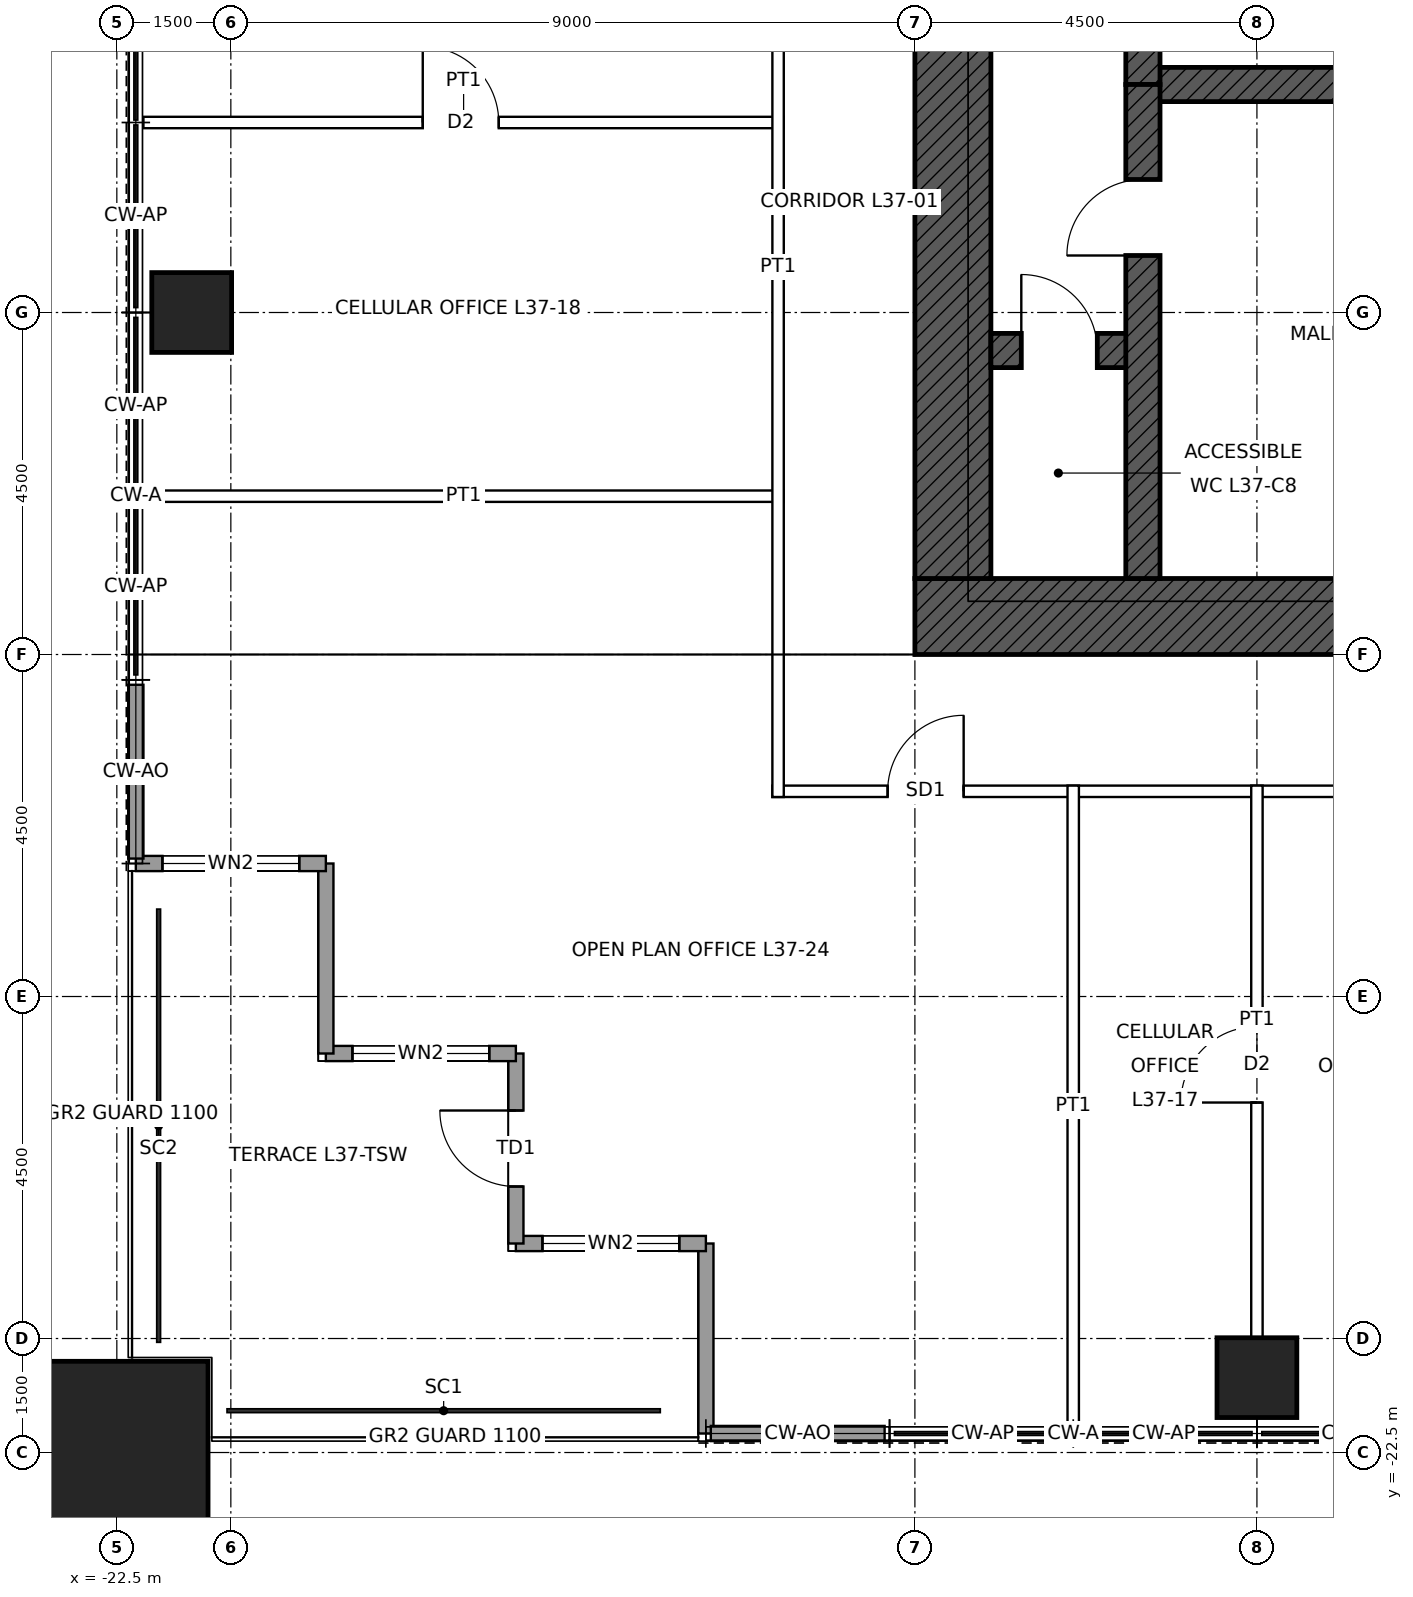
"""IFC4 building model, lengths in metres.
Left out: names, types, materials, properties, quantities, classifications, styles, units other than length and angle.
Written with IfcOpenShell. Run it as: python <this file> out.ifc"""

import sys

from ifc_helpers import new_model, si_unit, direction, frame, frame_2d, origin, origin_2d, place, context, subcontext, project, spatial, rectangle, hollow_rectangle, extrude, element, fill, save


model = new_model("IFC4")
c1 = context("Model", 3, precision=1e-05, world=origin(), true_north=direction((0.0, 1.0)))
c2 = subcontext(c1, "Body", "Model", "MODEL_VIEW")
j1 = project(units=[si_unit("LENGTHUNIT", "METRE"), si_unit("PLANEANGLEUNIT", "RADIAN")], contexts=[c1])
p1 = place(None, origin())
s1 = spatial("IfcSite", under=j1, at=p1, CompositionType="ELEMENT")
p2 = place(p1, origin())
s2 = spatial("IfcBuilding", under=s1, at=p2, CompositionType="ELEMENT")
p3 = place(p2, frame((0.0, 0.0, 181.9)))
s3 = spatial("IfcBuildingStorey", under=s2, at=p3, CompositionType="ELEMENT", Elevation=181.9)
p4 = place(p3, frame((-22.5, -22.5, 0.0), z_axis=(0.0, 0.0, 1.0), x_axis=(1.0, 0.0, 0.0)))
e1 = element("IfcColumn", 1, at=p4, inside=s3, PredefinedType="COLUMN", context=c2, shape_type="SweptSolid", body=[
    extrude(hollow_rectangle(XDim=2.4, YDim=2.4, WallThickness=0.12, at=origin_2d()), origin(), (0.0, 0.0, 1.0), 4.0),
])
for number, where, z_axis, x_axis in (
    (2, (-7.5, -21.515, 0.0), (0.0, 0.0, 1.0), (1.0, 0.0, 0.0)),
    (3, (-21.515, -7.5, 0.0), (0.0, 0.0, 1.0), (1.0, 0.0, 0.0)),
):
    element("IfcColumn", number, at=place(p3, frame(where, z_axis=z_axis, x_axis=x_axis)), inside=s3, PredefinedType="COLUMN", context=c2, shape_type="SweptSolid", body=[
        extrude(hollow_rectangle(XDim=1.05, YDim=1.05, WallThickness=0.075, at=origin_2d()), origin(), (0.0, 0.0, 1.0), 4.0),
    ])
p5 = place(p3, frame((12.0, -11.5, 0.0), z_axis=(0.0, 0.0, 1.0), x_axis=(-1.0, 0.0, 0.0)))
e4 = element("IfcWall", 4, at=p5, inside=s3, PredefinedType="SHEAR", context=c2, shape_type="SweptSolid", body=[
    extrude(rectangle(XDim=24.0, YDim=1.0, at=frame_2d((12.0, 0.0))), origin(), (0.0, 0.0, 1.0), 4.0),
])
p6 = place(p5, frame((11.5, 0.0, 0.0)))
e5 = element("IfcOpeningElement", 5, at=p6, cuts=e4, PredefinedType="OPENING", context=c2, shape_type="SweptSolid", body=[
    extrude(rectangle(XDim=1.0, YDim=2.1, at=frame_2d((0.5, 1.05))), frame((0.0, 0.51, 0.0), z_axis=(0.0, -1.0, 0.0), x_axis=(1.0, 0.0, 0.0)), (0.0, 0.0, 1.0), 1.02),
])
p7 = place(p5, frame((1.0, 0.0, 0.0)))
e6 = element("IfcOpeningElement", 6, at=p7, cuts=e4, PredefinedType="OPENING", context=c2, shape_type="SweptSolid", body=[
    extrude(rectangle(XDim=1.0, YDim=2.4, at=frame_2d((0.5, 1.2))), frame((0.0, 0.51, 0.0), z_axis=(0.0, -1.0, 0.0), x_axis=(1.0, 0.0, 0.0)), (0.0, 0.0, 1.0), 1.02),
])
p8 = place(p3, frame((-11.5, -11.0, 0.0), z_axis=(0.0, 0.0, 1.0), x_axis=(0.0, 1.0, 0.0)))
e7 = element("IfcWall", 7, at=p8, inside=s3, PredefinedType="SHEAR", context=c2, shape_type="SweptSolid", body=[
    extrude(rectangle(XDim=22.0, YDim=1.0, at=frame_2d((11.0, 0.0))), origin(), (0.0, 0.0, 1.0), 4.0),
])
p9 = place(p8, frame((10.5, 0.0, 0.0)))
e8 = element("IfcOpeningElement", 8, at=p9, cuts=e7, PredefinedType="OPENING", context=c2, shape_type="SweptSolid", body=[
    extrude(rectangle(XDim=1.0, YDim=2.4, at=frame_2d((0.5, 1.2))), frame((0.0, 0.51, 0.0), z_axis=(0.0, -1.0, 0.0), x_axis=(1.0, 0.0, 0.0)), (0.0, 0.0, 1.0), 1.02),
])
p10 = place(p3, frame((-9.0, -4.5, 0.0), z_axis=(0.0, 0.0, 1.0), x_axis=(1.0, 0.0, 0.0)))
e9 = element("IfcWall", 9, at=p10, inside=s3, PredefinedType="SHEAR", context=c2, shape_type="SweptSolid", body=[
    extrude(rectangle(XDim=18.0, YDim=0.45, at=frame_2d((9.0, 0.0))), origin(), (0.0, 0.0, 1.0), 4.0),
])
p11 = place(p3, frame((-11.0, -8.0, 0.0), z_axis=(0.0, 0.0, 1.0), x_axis=(1.0, 0.0, 0.0)))
e10 = element("IfcWall", 10, at=p11, inside=s3, PredefinedType="SHEAR", context=c2, shape_type="SweptSolid", body=[
    extrude(rectangle(XDim=2.0, YDim=0.45, at=frame_2d((1.0, 0.0))), origin(), (0.0, 0.0, 1.0), 4.0),
])
p12 = place(p11, frame((0.4, 0.0, 0.0)))
e11 = element("IfcOpeningElement", 11, at=p12, cuts=e10, PredefinedType="OPENING", context=c2, shape_type="SweptSolid", body=[
    extrude(rectangle(XDim=1.0, YDim=2.1, at=frame_2d((0.5, 1.05))), frame((0.0, 0.235, 0.0), z_axis=(0.0, -1.0, 0.0), x_axis=(1.0, 0.0, 0.0)), (0.0, 0.0, 1.0), 0.47),
])
p13 = place(p3, frame((-9.0, -4.5, 0.0), z_axis=(0.0, 0.0, 1.0), x_axis=(0.0, 1.0, 0.0)))
e12 = element("IfcWall", 12, at=p13, inside=s3, PredefinedType="SHEAR", context=c2, shape_type="SweptSolid", body=[
    extrude(rectangle(XDim=3.0, YDim=0.45, at=frame_2d((1.5, 0.0))), origin(), (0.0, 0.0, 1.0), 4.0),
])
p14 = place(p3, frame((-9.0, -11.0, 0.0), z_axis=(0.0, 0.0, 1.0), x_axis=(0.0, 1.0, 0.0)))
e13 = element("IfcWall", 13, at=p14, inside=s3, PredefinedType="SHEAR", context=c2, shape_type="SweptSolid", body=[
    extrude(rectangle(XDim=6.5, YDim=0.45, at=frame_2d((3.25, 0.0))), origin(), (0.0, 0.0, 1.0), 4.0),
])
p15 = place(p14, frame((4.25, 0.0, 0.0)))
e14 = element("IfcOpeningElement", 14, at=p15, cuts=e13, PredefinedType="OPENING", context=c2, shape_type="SweptSolid", body=[
    extrude(rectangle(XDim=1.0, YDim=2.1, at=frame_2d((0.5, 1.05))), frame((0.0, 0.235, 0.0), z_axis=(0.0, -1.0, 0.0), x_axis=(1.0, 0.0, 0.0)), (0.0, 0.0, 1.0), 0.47),
])
p16 = place(p3, frame((-14.75, -22.25, 0.0), z_axis=(0.0, 0.0, 1.0), x_axis=(0.0, 1.0, 0.0)))
e15 = element("IfcWall", 15, at=p16, inside=s3, PredefinedType="SOLIDWALL", context=c2, shape_type="SweptSolid", body=[
    extrude(rectangle(XDim=2.5, YDim=0.2, at=frame_2d((1.25, 0.0))), origin(), (0.0, 0.0, 1.0), 3.85),
])
p17 = place(p3, frame((-14.75, -19.75, 0.0), z_axis=(0.0, 0.0, 1.0), x_axis=(-1.0, 0.0, 0.0)))
e16 = element("IfcWall", 16, at=p17, inside=s3, PredefinedType="SOLIDWALL", context=c2, shape_type="SweptSolid", body=[
    extrude(rectangle(XDim=2.5, YDim=0.2, at=frame_2d((1.25, 0.0))), origin(), (0.0, 0.0, 1.0), 3.85),
])
p18 = place(p17, frame((0.35, 0.0, 0.3)))
e17 = element("IfcOpeningElement", 17, at=p18, cuts=e16, PredefinedType="OPENING", context=c2, shape_type="SweptSolid", body=[
    extrude(rectangle(XDim=1.8, YDim=2.4, at=frame_2d((0.9, 1.2))), frame((0.0, 0.11, 0.0), z_axis=(0.0, -1.0, 0.0), x_axis=(1.0, 0.0, 0.0)), (0.0, 0.0, 1.0), 0.22),
])
p19 = place(p3, frame((-17.25, -19.75, 0.0), z_axis=(0.0, 0.0, 1.0), x_axis=(0.0, 1.0, 0.0)))
e18 = element("IfcWall", 18, at=p19, inside=s3, PredefinedType="SOLIDWALL", context=c2, shape_type="SweptSolid", body=[
    extrude(rectangle(XDim=2.5, YDim=0.2, at=frame_2d((1.25, 0.0))), origin(), (0.0, 0.0, 1.0), 3.85),
])
p20 = place(p19, frame((0.75, 0.0, 0.0)))
e19 = element("IfcOpeningElement", 19, at=p20, cuts=e18, PredefinedType="OPENING", context=c2, shape_type="SweptSolid", body=[
    extrude(rectangle(XDim=1.0, YDim=2.4, at=frame_2d((0.5, 1.2))), frame((0.0, 0.11, 0.0), z_axis=(0.0, -1.0, 0.0), x_axis=(1.0, 0.0, 0.0)), (0.0, 0.0, 1.0), 0.22),
])
p21 = place(p3, frame((-17.25, -17.25, 0.0), z_axis=(0.0, 0.0, 1.0), x_axis=(-1.0, 0.0, 0.0)))
e20 = element("IfcWall", 20, at=p21, inside=s3, PredefinedType="SOLIDWALL", context=c2, shape_type="SweptSolid", body=[
    extrude(rectangle(XDim=2.5, YDim=0.2, at=frame_2d((1.25, 0.0))), origin(), (0.0, 0.0, 1.0), 3.85),
])
p22 = place(p21, frame((0.35, 0.0, 0.3)))
e21 = element("IfcOpeningElement", 21, at=p22, cuts=e20, PredefinedType="OPENING", context=c2, shape_type="SweptSolid", body=[
    extrude(rectangle(XDim=1.8, YDim=2.4, at=frame_2d((0.9, 1.2))), frame((0.0, 0.11, 0.0), z_axis=(0.0, -1.0, 0.0), x_axis=(1.0, 0.0, 0.0)), (0.0, 0.0, 1.0), 0.22),
])
p23 = place(p3, frame((-19.75, -17.25, 0.0), z_axis=(0.0, 0.0, 1.0), x_axis=(0.0, 1.0, 0.0)))
e22 = element("IfcWall", 22, at=p23, inside=s3, PredefinedType="SOLIDWALL", context=c2, shape_type="SweptSolid", body=[
    extrude(rectangle(XDim=2.5, YDim=0.2, at=frame_2d((1.25, 0.0))), origin(), (0.0, 0.0, 1.0), 3.85),
])
p24 = place(p3, frame((-19.75, -14.75, 0.0), z_axis=(0.0, 0.0, 1.0), x_axis=(-1.0, 0.0, 0.0)))
e23 = element("IfcWall", 23, at=p24, inside=s3, PredefinedType="SOLIDWALL", context=c2, shape_type="SweptSolid", body=[
    extrude(rectangle(XDim=2.5, YDim=0.2, at=frame_2d((1.25, 0.0))), origin(), (0.0, 0.0, 1.0), 3.85),
])
p25 = place(p24, frame((0.35, 0.0, 0.3)))
e24 = element("IfcOpeningElement", 24, at=p25, cuts=e23, PredefinedType="OPENING", context=c2, shape_type="SweptSolid", body=[
    extrude(rectangle(XDim=1.8, YDim=2.4, at=frame_2d((0.9, 1.2))), frame((0.0, 0.11, 0.0), z_axis=(0.0, -1.0, 0.0), x_axis=(1.0, 0.0, 0.0)), (0.0, 0.0, 1.0), 0.22),
])
for number, where, z_axis, x_axis in (
    (25, (-12.398, -22.25, 0.0), (0.0, 0.0, 1.0), (-1.0, 0.0, 0.0)),
    (26, (-22.25, -14.685, 0.0), (0.0, 0.0, 1.0), (0.0, 1.0, 0.0)),
):
    element("IfcWall", number, at=place(p3, frame(where, z_axis=z_axis, x_axis=x_axis)), inside=s3, PredefinedType="SOLIDWALL", context=c2, shape_type="SweptSolid", body=[
        extrude(rectangle(XDim=2.287, YDim=0.2, at=frame_2d((1.144, 0.0))), origin(), (0.0, 0.0, 1.0), 3.85),
    ])
p26 = place(p3, frame((-13.875, -13.8, 0.0), z_axis=(0.0, 0.0, 1.0), x_axis=(1.0, 0.0, 0.0)))
e27 = element("IfcWall", 27, at=p26, inside=s3, PredefinedType="PARTITIONING", context=c2, shape_type="SweptSolid", body=[
    extrude(rectangle(XDim=27.75, YDim=0.15, at=frame_2d((13.875, 0.0))), origin(), (0.0, 0.0, 1.0), 3.85),
])
p27 = place(p26, frame((18.375, 0.0, 0.0)))
e28 = element("IfcOpeningElement", 28, at=p27, cuts=e27, PredefinedType="OPENING", context=c2, shape_type="SweptSolid", body=[
    extrude(rectangle(XDim=1.0, YDim=2.4, at=frame_2d((0.5, 1.2))), frame((0.0, 0.085, 0.0), z_axis=(0.0, -1.0, 0.0), x_axis=(1.0, 0.0, 0.0)), (0.0, 0.0, 1.0), 0.17),
])
p28 = place(p26, frame((14.975, 0.0, 0.0)))
e29 = element("IfcOpeningElement", 29, at=p28, cuts=e27, PredefinedType="OPENING", context=c2, shape_type="SweptSolid", body=[
    extrude(rectangle(XDim=1.0, YDim=2.1, at=frame_2d((0.5, 1.05))), frame((0.0, 0.085, 0.0), z_axis=(0.0, -1.0, 0.0), x_axis=(1.0, 0.0, 0.0)), (0.0, 0.0, 1.0), 0.17),
])
p29 = place(p26, frame((11.775, 0.0, 0.0)))
e30 = element("IfcOpeningElement", 30, at=p29, cuts=e27, PredefinedType="OPENING", context=c2, shape_type="SweptSolid", body=[
    extrude(rectangle(XDim=1.0, YDim=2.1, at=frame_2d((0.5, 1.05))), frame((0.0, 0.085, 0.0), z_axis=(0.0, -1.0, 0.0), x_axis=(1.0, 0.0, 0.0)), (0.0, 0.0, 1.0), 0.17),
])
p30 = place(p26, frame((8.375, 0.0, 0.0)))
e31 = element("IfcOpeningElement", 31, at=p30, cuts=e27, PredefinedType="OPENING", context=c2, shape_type="SweptSolid", body=[
    extrude(rectangle(XDim=1.0, YDim=2.4, at=frame_2d((0.5, 1.2))), frame((0.0, 0.085, 0.0), z_axis=(0.0, -1.0, 0.0), x_axis=(1.0, 0.0, 0.0)), (0.0, 0.0, 1.0), 0.17),
])
p31 = place(p26, frame((25.65, 0.0, 0.0)))
e32 = element("IfcOpeningElement", 32, at=p31, cuts=e27, PredefinedType="OPENING", context=c2, shape_type="SweptSolid", body=[
    extrude(rectangle(XDim=1.0, YDim=2.4, at=frame_2d((0.5, 1.2))), frame((0.0, 0.085, 0.0), z_axis=(0.0, -1.0, 0.0), x_axis=(1.0, 0.0, 0.0)), (0.0, 0.0, 1.0), 0.17),
])
p32 = place(p26, frame((1.517, 0.0, 0.0)))
e33 = element("IfcOpeningElement", 33, at=p32, cuts=e27, PredefinedType="OPENING", context=c2, shape_type="SweptSolid", body=[
    extrude(rectangle(XDim=1.0, YDim=2.4, at=frame_2d((0.5, 1.2))), frame((0.0, 0.085, 0.0), z_axis=(0.0, -1.0, 0.0), x_axis=(1.0, 0.0, 0.0)), (0.0, 0.0, 1.0), 0.17),
])
p33 = place(p3, frame((-22.15, -9.917, 0.0), z_axis=(0.0, 0.0, 1.0), x_axis=(1.0, 0.0, 0.0)))
e34 = element("IfcWall", 34, at=p33, inside=s3, PredefinedType="PARTITIONING", context=c2, shape_type="SweptSolid", body=[
    extrude(rectangle(XDim=8.425, YDim=0.15, at=frame_2d((4.212, 0.0))), origin(), (0.0, 0.0, 1.0), 3.85),
])
p34 = place(p3, frame((-22.15, -5.0, 0.0), z_axis=(0.0, 0.0, 1.0), x_axis=(1.0, 0.0, 0.0)))
e35 = element("IfcWall", 35, at=p34, inside=s3, PredefinedType="PARTITIONING", context=c2, shape_type="SweptSolid", body=[
    extrude(rectangle(XDim=8.425, YDim=0.15, at=frame_2d((4.212, 0.0))), origin(), (0.0, 0.0, 1.0), 3.85),
])
p35 = place(p34, frame((3.675, 0.0, 0.0)))
e36 = element("IfcOpeningElement", 36, at=p35, cuts=e35, PredefinedType="OPENING", context=c2, shape_type="SweptSolid", body=[
    extrude(rectangle(XDim=1.0, YDim=2.1, at=frame_2d((0.5, 1.05))), frame((0.0, 0.085, 0.0), z_axis=(0.0, -1.0, 0.0), x_axis=(1.0, 0.0, 0.0)), (0.0, 0.0, 1.0), 0.17),
])
p36 = place(p3, frame((-13.8, -13.875, 0.0), z_axis=(0.0, 0.0, 1.0), x_axis=(0.0, 1.0, 0.0)))
e37 = element("IfcWall", 37, at=p36, inside=s3, PredefinedType="PARTITIONING", context=c2, shape_type="SweptSolid", body=[
    extrude(rectangle(XDim=13.95, YDim=0.15, at=frame_2d((6.975, 0.0))), origin(), (0.0, 0.0, 1.0), 3.85),
])
p37 = place(p36, frame((10.875, 0.0, 0.0)))
e38 = element("IfcOpeningElement", 38, at=p37, cuts=e37, PredefinedType="OPENING", context=c2, shape_type="SweptSolid", body=[
    extrude(rectangle(XDim=1.0, YDim=2.4, at=frame_2d((0.5, 1.2))), frame((0.0, 0.085, 0.0), z_axis=(0.0, -1.0, 0.0), x_axis=(1.0, 0.0, 0.0)), (0.0, 0.0, 1.0), 0.17),
])
p38 = place(p3, frame((-9.917, -22.15, 0.0), z_axis=(0.0, 0.0, 1.0), x_axis=(0.0, 1.0, 0.0)))
e39 = element("IfcWall", 39, at=p38, inside=s3, PredefinedType="PARTITIONING", context=c2, shape_type="SweptSolid", body=[
    extrude(rectangle(XDim=8.425, YDim=0.15, at=frame_2d((4.212, 0.0))), origin(), (0.0, 0.0, 1.0), 3.85),
])
p39 = place(p3, frame((-7.5, -20.99, 0.0), z_axis=(0.0, 0.0, 1.0), x_axis=(0.0, 1.0, 0.0)))
e40 = element("IfcWall", 40, at=p39, inside=s3, PredefinedType="PARTITIONING", context=c2, shape_type="SweptSolid", body=[
    extrude(rectangle(XDim=7.265, YDim=0.15, at=frame_2d((3.632, 0.0))), origin(), (0.0, 0.0, 1.0), 3.238),
])
p40 = place(p39, frame((3.095, 0.0, 0.0)))
e41 = element("IfcOpeningElement", 41, at=p40, cuts=e40, PredefinedType="OPENING", context=c2, shape_type="SweptSolid", body=[
    extrude(rectangle(XDim=1.0, YDim=2.1, at=frame_2d((0.5, 1.05))), frame((0.0, 0.085, 0.0), z_axis=(0.0, -1.0, 0.0), x_axis=(1.0, 0.0, 0.0)), (0.0, 0.0, 1.0), 0.17),
])
p41 = place(p18, origin())
e42 = element("IfcWindow", 42, at=p41, inside=s3, PartitioningType="SINGLE_PANEL", PredefinedType="WINDOW", context=c2, shape_type="SweptSolid", body=[
    extrude(rectangle(XDim=1.8, YDim=2.4, at=frame_2d((0.9, 1.2))), frame((0.0, 0.03, 0.0), z_axis=(0.0, -1.0, 0.0), x_axis=(1.0, 0.0, 0.0)), (0.0, 0.0, 1.0), 0.06),
])
fill(e17, e42)
p42 = place(p20, origin())
e43 = element("IfcDoor", 43, at=p42, inside=s3, OperationType="SINGLE_SWING_RIGHT", PredefinedType="DOOR", context=c2, shape_type="SweptSolid", body=[
    extrude(rectangle(XDim=1.0, YDim=2.4, at=frame_2d((0.5, 1.2))), frame((0.0, 0.025, 0.0), z_axis=(0.0, -1.0, 0.0), x_axis=(1.0, 0.0, 0.0)), (0.0, 0.0, 1.0), 0.05),
])
fill(e19, e43)
p43 = place(p22, origin())
e44 = element("IfcWindow", 44, at=p43, inside=s3, PartitioningType="SINGLE_PANEL", PredefinedType="WINDOW", context=c2, shape_type="SweptSolid", body=[
    extrude(rectangle(XDim=1.8, YDim=2.4, at=frame_2d((0.9, 1.2))), frame((0.0, 0.03, 0.0), z_axis=(0.0, -1.0, 0.0), x_axis=(1.0, 0.0, 0.0)), (0.0, 0.0, 1.0), 0.06),
])
fill(e21, e44)
p44 = place(p25, origin())
e45 = element("IfcWindow", 45, at=p44, inside=s3, PartitioningType="SINGLE_PANEL", PredefinedType="WINDOW", context=c2, shape_type="SweptSolid", body=[
    extrude(rectangle(XDim=1.8, YDim=2.4, at=frame_2d((0.9, 1.2))), frame((0.0, 0.03, 0.0), z_axis=(0.0, -1.0, 0.0), x_axis=(1.0, 0.0, 0.0)), (0.0, 0.0, 1.0), 0.06),
])
fill(e24, e45)
p45 = place(p15, origin())
e46 = element("IfcDoor", 46, at=p45, inside=s3, OperationType="SINGLE_SWING_LEFT", PredefinedType="DOOR", context=c2, shape_type="SweptSolid", body=[
    extrude(rectangle(XDim=1.0, YDim=2.1, at=frame_2d((0.5, 1.05))), frame((0.0, 0.025, 0.0), z_axis=(0.0, -1.0, 0.0), x_axis=(1.0, 0.0, 0.0)), (0.0, 0.0, 1.0), 0.05),
])
fill(e14, e46)
p46 = place(p12, origin())
e47 = element("IfcDoor", 47, at=p46, inside=s3, OperationType="SINGLE_SWING_LEFT", PredefinedType="DOOR", context=c2, shape_type="SweptSolid", body=[
    extrude(rectangle(XDim=1.0, YDim=2.1, at=frame_2d((0.5, 1.05))), frame((0.0, 0.025, 0.0), z_axis=(0.0, -1.0, 0.0), x_axis=(1.0, 0.0, 0.0)), (0.0, 0.0, 1.0), 0.05),
])
fill(e11, e47)
p47 = place(p40, origin())
e48 = element("IfcDoor", 48, at=p47, inside=s3, OperationType="SINGLE_SWING_LEFT", PredefinedType="DOOR", context=c2, shape_type="SweptSolid", body=[
    extrude(rectangle(XDim=1.0, YDim=2.1, at=frame_2d((0.5, 1.05))), frame((0.0, 0.025, 0.0), z_axis=(0.0, -1.0, 0.0), x_axis=(1.0, 0.0, 0.0)), (0.0, 0.0, 1.0), 0.05),
])
fill(e41, e48)
p48 = place(p35, origin())
e49 = element("IfcDoor", 49, at=p48, inside=s3, OperationType="SINGLE_SWING_LEFT", PredefinedType="DOOR", context=c2, shape_type="SweptSolid", body=[
    extrude(rectangle(XDim=1.0, YDim=2.1, at=frame_2d((0.5, 1.05))), frame((0.0, 0.025, 0.0), z_axis=(0.0, -1.0, 0.0), x_axis=(1.0, 0.0, 0.0)), (0.0, 0.0, 1.0), 0.05),
])
fill(e36, e49)
p49 = place(p32, origin())
e50 = element("IfcDoor", 50, at=p49, inside=s3, OperationType="SINGLE_SWING_RIGHT", PredefinedType="DOOR", context=c2, shape_type="SweptSolid", body=[
    extrude(rectangle(XDim=1.0, YDim=2.4, at=frame_2d((0.5, 1.2))), frame((0.0, 0.025, 0.0), z_axis=(0.0, -1.0, 0.0), x_axis=(1.0, 0.0, 0.0)), (0.0, 0.0, 1.0), 0.05),
])
fill(e33, e50)
save(model, sys.argv[1])
